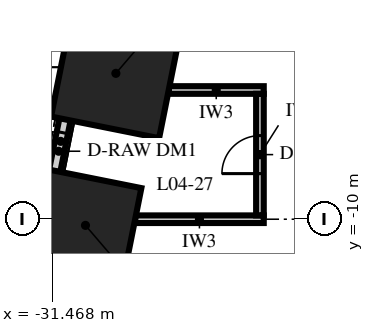
"""IFC4 building model, lengths in metres.
Left out: names, types, materials, properties, quantities, classifications, styles, units other than length and angle.
Written with IfcOpenShell. Run it as: python <this file> out.ifc"""

import sys

from ifc_helpers import new_model, si_unit, direction, frame, frame_2d, origin, origin_2d, place, context, subcontext, project, spatial, rectangle, extrude, element, fill, save


model = new_model("IFC4")
c1 = context("Model", 3, precision=1e-05, world=origin(), true_north=direction((0.0, 1.0)))
c2 = subcontext(c1, "Body", "Model", "MODEL_VIEW")
j1 = project(units=[si_unit("LENGTHUNIT", "METRE"), si_unit("PLANEANGLEUNIT", "RADIAN")], contexts=[c1])
p1 = place(None, origin())
s1 = spatial("IfcSite", under=j1, at=p1, CompositionType="ELEMENT")
p2 = place(p1, origin())
s2 = spatial("IfcBuilding", under=s1, at=p2, CompositionType="ELEMENT")
p3 = place(p2, frame((0.0, 0.0, 28.0)))
s3 = spatial("IfcBuildingStorey", under=s2, at=p3, CompositionType="ELEMENT", Elevation=28.0)
p4 = place(p3, frame((-29.791, -6.162, 0.0), z_axis=(0.0, 0.0, 1.0), x_axis=(-0.196116135138, -0.980580675691, 0.0)))
e1 = element("IfcColumn", 1, at=p4, inside=s3, PredefinedType="COLUMN", context=c2, shape_type="SweptSolid", body=[
    extrude(rectangle(XDim=2.9, YDim=2.9, at=origin_2d()), origin(), (0.0, 0.0, 1.0), 4.0),
])
p5 = place(p3, frame((-30.591, -10.162, -0.85), z_axis=(0.0, 0.0, 1.0), x_axis=(-0.196116135138, -0.980580675691, 0.0)))
e2 = element("IfcColumn", 2, at=p5, inside=s3, PredefinedType="COLUMN", context=c2, shape_type="SweptSolid", body=[
    extrude(rectangle(XDim=2.5, YDim=2.5, at=origin_2d()), origin(), (0.0, 0.0, 1.0), 4.85),
])
p6 = place(p3, frame((-30.889, -6.172, 0.0), z_axis=(0.0, 0.0, 1.0), x_axis=(-0.196167883278, -0.980570324643, 0.0)))
e3 = element("IfcWall", 3, at=p6, inside=s3, PredefinedType="SOLIDWALL", context=c2, shape_type="SweptSolid", body=[
    extrude(rectangle(XDim=3.629, YDim=0.3, at=frame_2d((1.814, 0.0))), origin(), (0.0, 0.0, 1.0), 4.0),
])
p7 = place(p6, frame((1.58, 0.0, 0.0)))
e4 = element("IfcOpeningElement", 4, at=p7, cuts=e3, PredefinedType="OPENING", context=c2, shape_type="SweptSolid", body=[
    extrude(rectangle(XDim=1.0, YDim=2.2, at=frame_2d((0.5, 1.1))), frame((0.0, 0.165, 0.0), z_axis=(0.0, -1.0, 0.0), x_axis=(1.0, 0.0, 0.0)), (0.0, 0.0, 1.0), 0.33),
])
p8 = place(p3, frame((-29.284, -10.0, 0.0), z_axis=(0.0, 0.0, 1.0), x_axis=(1.0, 0.0, 0.0)))
e5 = element("IfcWall", 5, at=p8, inside=s3, PredefinedType="PARTITIONING", context=c2, shape_type="SweptSolid", body=[
    extrude(rectangle(XDim=3.384, YDim=0.2, at=frame_2d((1.692, 0.0))), origin(), (0.0, 0.0, 1.0), 3.25),
])
p9 = place(p3, frame((-28.4, -6.6, 0.0), z_axis=(0.0, 0.0, 1.0), x_axis=(1.0, 0.0, 0.0)))
e6 = element("IfcWall", 6, at=p9, inside=s3, PredefinedType="PARTITIONING", context=c2, shape_type="SweptSolid", body=[
    extrude(rectangle(XDim=2.5, YDim=0.2, at=frame_2d((1.25, 0.0))), origin(), (0.0, 0.0, 1.0), 3.25),
])
p10 = place(p3, frame((-26.0, -9.9, 0.0), z_axis=(0.0, 0.0, 1.0), x_axis=(0.0, 1.0, 0.0)))
e7 = element("IfcWall", 7, at=p10, inside=s3, PredefinedType="PARTITIONING", context=c2, shape_type="SweptSolid", body=[
    extrude(rectangle(XDim=3.2, YDim=0.2, at=frame_2d((1.6, 0.0))), origin(), (0.0, 0.0, 1.0), 3.25),
])
p11 = place(p10, frame((1.1, 0.0, 0.0)))
e8 = element("IfcOpeningElement", 8, at=p11, cuts=e7, PredefinedType="OPENING", context=c2, shape_type="SweptSolid", body=[
    extrude(rectangle(XDim=1.0, YDim=2.1, at=frame_2d((0.5, 1.05))), frame((0.0, 0.115, 0.0), z_axis=(0.0, -1.0, 0.0), x_axis=(1.0, 0.0, 0.0)), (0.0, 0.0, 1.0), 0.23),
])
p12 = place(p7, frame((1.0, 0.0, 0.0), z_axis=(0.0, 0.0, 1.0), x_axis=(-1.0, 0.0, 0.0)))
e9 = element("IfcDoor", 9, at=p12, inside=s3, OperationType="SINGLE_SWING_RIGHT", PredefinedType="DOOR", context=c2, shape_type="SweptSolid", body=[
    extrude(rectangle(XDim=1.0, YDim=2.2, at=frame_2d((0.5, 1.1))), frame((0.0, 0.15, 0.0), z_axis=(0.0, -1.0, 0.0), x_axis=(1.0, 0.0, 0.0)), (0.0, 0.0, 1.0), 0.3),
])
fill(e4, e9)
p13 = place(p11, origin())
e10 = element("IfcDoor", 10, at=p13, inside=s3, OperationType="SINGLE_SWING_RIGHT", PredefinedType="DOOR", context=c2, shape_type="SweptSolid", body=[
    extrude(rectangle(XDim=1.0, YDim=2.1, at=frame_2d((0.5, 1.05))), frame((0.0, 0.1, 0.0), z_axis=(0.0, -1.0, 0.0), x_axis=(1.0, 0.0, 0.0)), (0.0, 0.0, 1.0), 0.199),
])
fill(e8, e10)
save(model, sys.argv[1])
